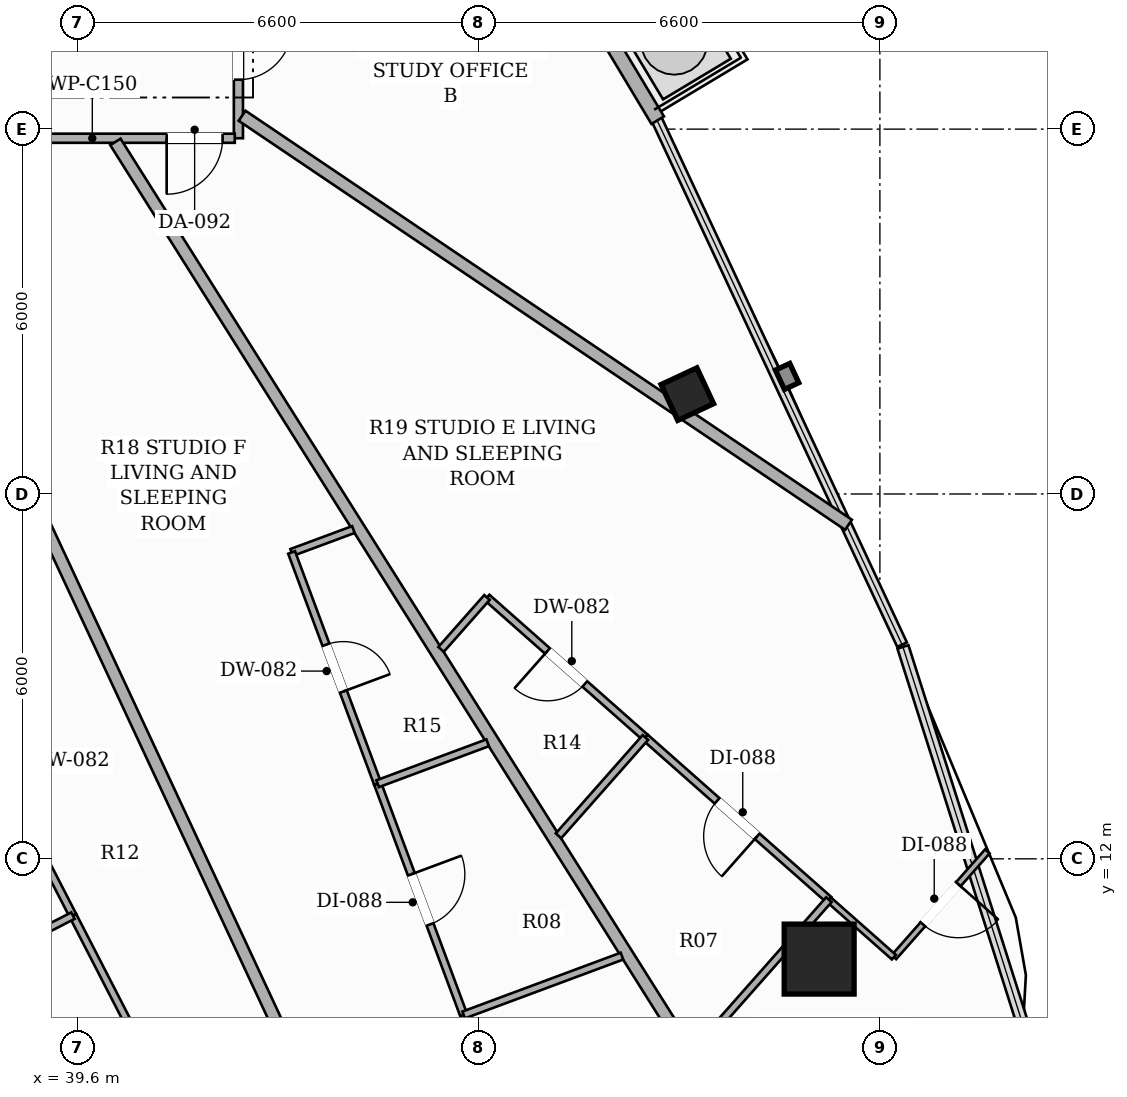
"""IFC4 building model, lengths in metres.
Left out: names, types, materials, properties, quantities, classifications, styles, units other than length and angle.
Written with IfcOpenShell. Run it as: python <this file> out.ifc"""

import sys

from ifc_helpers import new_model, si_unit, direction, frame, frame_2d, origin, origin_2d, place, context, subcontext, project, spatial, rectangle, hollow_rectangle, extrude, element, fill, save


model = new_model("IFC4")
c1 = context("Model", 3, precision=1e-05, world=origin(), true_north=direction((0.0, 1.0)))
c2 = subcontext(c1, "Body", "Model", "MODEL_VIEW")
j1 = project(units=[si_unit("LENGTHUNIT", "METRE"), si_unit("PLANEANGLEUNIT", "RADIAN")], contexts=[c1])
p1 = place(None, origin())
s1 = spatial("IfcSite", under=j1, at=p1, CompositionType="ELEMENT")
p2 = place(p1, origin())
s2 = spatial("IfcBuilding", under=s1, at=p2, CompositionType="ELEMENT")
p3 = place(p2, frame((0.0, 0.0, 256.85)))
s3 = spatial("IfcBuildingStorey", under=s2, at=p3, CompositionType="ELEMENT", Elevation=256.85)
p4 = place(p3, frame((51.801, 10.351, 0.0), z_axis=(0.0, 0.0, 1.0), x_axis=(1.0, 0.0, 0.0)))
e1 = element("IfcColumn", 1, at=p4, inside=s3, PredefinedType="COLUMN", context=c2, shape_type="SweptSolid", body=[
    extrude(hollow_rectangle(XDim=1.15, YDim=1.15, WallThickness=0.036, at=origin_2d()), origin(), (0.0, 0.0, 1.0), 3.3),
])
p5 = place(p3, frame((49.633, 19.642, 0.0), z_axis=(0.0, 0.0, 1.0), x_axis=(-0.422618261741, 0.906307787037, 0.0)))
e2 = element("IfcColumn", 2, at=p5, inside=s3, PredefinedType="COLUMN", context=c2, shape_type="SweptSolid", body=[
    extrude(hollow_rectangle(XDim=0.65, YDim=0.65, WallThickness=0.022, at=origin_2d()), origin(), (0.0, 0.0, 1.0), 3.3),
])
p6 = place(p3, frame((49.146, 24.147, 0.0), z_axis=(0.0, 0.0, 1.0), x_axis=(-0.514275407092, 0.857625096216, 0.0)))
e3 = element("IfcWall", 3, at=p6, inside=s3, PredefinedType="SOLIDWALL", context=c2, shape_type="SweptSolid", body=[
    extrude(rectangle(XDim=9.777, YDim=0.24, at=frame_2d((4.889, 0.0))), origin(), (0.0, 0.0, 1.0), 2.624),
])
p7 = place(p6, frame((7.279, 0.0, 0.0)))
e4 = element("IfcOpeningElement", 4, at=p7, cuts=e3, PredefinedType="OPENING", context=c2, shape_type="SweptSolid", body=[
    extrude(rectangle(XDim=1.8, YDim=2.2, at=frame_2d((0.9, 1.1))), frame((0.0, 0.13, 0.0), z_axis=(0.0, -1.0, 0.0), x_axis=(1.0, 0.0, 0.0)), (0.0, 0.0, 1.0), 0.26),
])
p8 = place(p3, frame((42.25, 26.59, 0.0), z_axis=(0.0, 0.0, 1.0), x_axis=(0.0, -1.0, 0.0)))
e5 = element("IfcWall", 5, at=p8, inside=s3, PredefinedType="PARTITIONING", context=c2, shape_type="SweptSolid", body=[
    extrude(rectangle(XDim=2.74, YDim=0.15, at=frame_2d((1.37, 0.0))), origin(), (0.0, 0.0, 1.0), 2.773),
])
p9 = place(p8, frame((0.897, 0.0, 0.0)))
e6 = element("IfcOpeningElement", 6, at=p9, cuts=e5, PredefinedType="OPENING", context=c2, shape_type="SweptSolid", body=[
    extrude(rectangle(XDim=0.88, YDim=2.1, at=frame_2d((0.44, 1.05))), frame((0.0, 0.085, 0.0), z_axis=(0.0, -1.0, 0.0), x_axis=(1.0, 0.0, 0.0)), (0.0, 0.0, 1.0), 0.17),
])
p10 = place(p3, frame((42.19, 23.85, 0.0), z_axis=(0.0, 0.0, 1.0), x_axis=(-1.0, 0.0, 0.0)))
e7 = element("IfcWall", 7, at=p10, inside=s3, PredefinedType="PARTITIONING", context=c2, shape_type="SweptSolid", body=[
    extrude(rectangle(XDim=8.355, YDim=0.15, at=frame_2d((4.177, 0.0))), origin(), (0.0, 0.0, 1.0), 2.565),
])
p11 = place(p10, frame((0.2, 0.0, 0.0)))
e8 = element("IfcOpeningElement", 8, at=p11, cuts=e7, PredefinedType="OPENING", context=c2, shape_type="SweptSolid", body=[
    extrude(rectangle(XDim=0.92, YDim=2.15, at=frame_2d((0.46, 1.075))), frame((0.0, 0.085, 0.0), z_axis=(0.0, -1.0, 0.0), x_axis=(1.0, 0.0, 0.0)), (0.0, 0.0, 1.0), 0.17),
])
p12 = place(p10, frame((3.566, 0.0, 0.0)))
e9 = element("IfcOpeningElement", 9, at=p12, cuts=e7, PredefinedType="OPENING", context=c2, shape_type="SweptSolid", body=[
    extrude(rectangle(XDim=0.92, YDim=2.15, at=frame_2d((0.46, 1.075))), frame((0.0, 0.085, 0.0), z_axis=(0.0, -1.0, 0.0), x_axis=(1.0, 0.0, 0.0)), (0.0, 0.0, 1.0), 0.17),
])
p13 = place(p10, frame((6.432, 0.0, 0.0)))
e10 = element("IfcOpeningElement", 10, at=p13, cuts=e7, PredefinedType="OPENING", context=c2, shape_type="SweptSolid", body=[
    extrude(rectangle(XDim=0.92, YDim=2.15, at=frame_2d((0.46, 1.075))), frame((0.0, 0.085, 0.0), z_axis=(0.0, -1.0, 0.0), x_axis=(1.0, 0.0, 0.0)), (0.0, 0.0, 1.0), 0.17),
])
p14 = place(p3, frame((52.284, 17.493, 0.0), z_axis=(0.0, 0.0, 1.0), x_axis=(-0.829053532208, 0.559169241584, 0.0)))
e11 = element("IfcWall", 11, at=p14, inside=s3, PredefinedType="PARTITIONING", context=c2, shape_type="SweptSolid", body=[
    extrude(rectangle(XDim=12.031, YDim=0.2, at=frame_2d((6.015, 0.0))), origin(), (0.0, 0.0, 1.0), 2.492),
])
p15 = place(p3, frame((50.863, 6.899, 0.0), z_axis=(0.0, 0.0, 1.0), x_axis=(-0.532843438342, 0.846213844259, 0.0)))
e12 = element("IfcWall", 12, at=p15, inside=s3, PredefinedType="PARTITIONING", context=c2, shape_type="SweptSolid", body=[
    extrude(rectangle(XDim=19.961, YDim=0.2, at=frame_2d((9.98, 0.0))), origin(), (0.0, 0.0, 1.0), 2.492),
])
p16 = place(p3, frame((44.391, 6.058, 0.0), z_axis=(0.0, 0.0, 1.0), x_axis=(-0.422434507673, 0.906393450289, 0.0)))
e13 = element("IfcWall", 13, at=p16, inside=s3, PredefinedType="PARTITIONING", context=c2, shape_type="SweptSolid", body=[
    extrude(rectangle(XDim=19.563, YDim=0.2, at=frame_2d((9.782, 0.0))), origin(), (0.0, 0.0, 1.0), 2.492),
])
p17 = place(p3, frame((48.943, 13.995, 0.0), z_axis=(0.0, 0.0, 1.0), x_axis=(-0.749231040751, 0.662308725275, 0.0)))
e14 = element("IfcWall", 14, at=p17, inside=s3, PredefinedType="PARTITIONING", context=c2, shape_type="SweptSolid", body=[
    extrude(rectangle(XDim=3.477, YDim=0.12, at=frame_2d((1.739, 0.0))), origin(), (0.0, 0.0, 1.0), 2.565),
])
p18 = place(p17, frame((1.329, 0.0, 0.0)))
e15 = element("IfcOpeningElement", 15, at=p18, cuts=e14, PredefinedType="OPENING", context=c2, shape_type="SweptSolid", body=[
    extrude(rectangle(XDim=0.82, YDim=2.1, at=frame_2d((0.41, 1.05))), frame((0.0, 0.07, 0.0), z_axis=(0.0, -1.0, 0.0), x_axis=(1.0, 0.0, 0.0)), (0.0, 0.0, 1.0), 0.14),
])
p19 = place(p3, frame((46.338, 16.298, 0.0), z_axis=(0.0, 0.0, 1.0), x_axis=(-0.662287293934, -0.749249985181, 0.0)))
e16 = element("IfcWall", 16, at=p19, inside=s3, PredefinedType="PARTITIONING", context=c2, shape_type="SweptSolid", body=[
    extrude(rectangle(XDim=1.14, YDim=0.12, at=frame_2d((0.57, 0.0))), origin(), (0.0, 0.0, 1.0), 3.06),
])
p20 = place(p3, frame((51.961, 11.328, 0.0), z_axis=(0.0, 0.0, 1.0), x_axis=(-0.749289212621, 0.662242913024, 0.0)))
e17 = element("IfcWall", 17, at=p20, inside=s3, PredefinedType="PARTITIONING", context=c2, shape_type="SweptSolid", body=[
    extrude(rectangle(XDim=4.028, YDim=0.12, at=frame_2d((2.014, 0.0))), origin(), (0.0, 0.0, 1.0), 2.492),
])
p21 = place(p20, frame((1.574, 0.0, 0.0)))
e18 = element("IfcOpeningElement", 18, at=p21, cuts=e17, PredefinedType="OPENING", context=c2, shape_type="SweptSolid", body=[
    extrude(rectangle(XDim=0.88, YDim=2.1, at=frame_2d((0.44, 1.05))), frame((0.0, 0.07, 0.0), z_axis=(0.0, -1.0, 0.0), x_axis=(1.0, 0.0, 0.0)), (0.0, 0.0, 1.0), 0.14),
])
p22 = place(p3, frame((54.567, 12.122, 0.0), z_axis=(0.0, 0.0, 1.0), x_axis=(-0.662212906575, -0.749315732095, 0.0)))
e19 = element("IfcWall", 19, at=p22, inside=s3, PredefinedType="PARTITIONING", context=c2, shape_type="SweptSolid", body=[
    extrude(rectangle(XDim=2.321, YDim=0.1, at=frame_2d((1.16, 0.0))), origin(), (0.0, 0.0, 1.0), 3.06),
])
p23 = place(p22, frame((0.72, 0.0, 0.0)))
e20 = element("IfcOpeningElement", 20, at=p23, cuts=e19, PredefinedType="OPENING", context=c2, shape_type="SweptSolid", body=[
    extrude(rectangle(XDim=0.88, YDim=2.1, at=frame_2d((0.44, 1.05))), frame((0.0, 0.06, 0.0), z_axis=(0.0, -1.0, 0.0), x_axis=(1.0, 0.0, 0.0)), (0.0, 0.0, 1.0), 0.12),
])
p24 = place(p3, frame((53.03, 10.383, 0.0), z_axis=(0.0, 0.0, 1.0), x_axis=(-0.749313288423, 0.66221567166, 0.0)))
e21 = element("IfcWall", 21, at=p24, inside=s3, PredefinedType="PARTITIONING", context=c2, shape_type="SweptSolid", body=[
    extrude(rectangle(XDim=1.427, YDim=0.1, at=frame_2d((0.713, 0.0))), origin(), (0.0, 0.0, 1.0), 2.492),
])
p25 = place(p3, frame((48.943, 13.995, 0.0), z_axis=(0.0, 0.0, 1.0), x_axis=(-0.662212567735, -0.749316031547, 0.0)))
e22 = element("IfcWall", 22, at=p25, inside=s3, PredefinedType="PARTITIONING", context=c2, shape_type="SweptSolid", body=[
    extrude(rectangle(XDim=2.158, YDim=0.12, at=frame_2d((1.079, 0.0))), origin(), (0.0, 0.0, 1.0), 2.565),
])
p26 = place(p3, frame((51.961, 11.328, 0.0), z_axis=(0.0, 0.0, 1.0), x_axis=(-0.662327669466, -0.74921429395, 0.0)))
e23 = element("IfcWall", 23, at=p26, inside=s3, PredefinedType="PARTITIONING", context=c2, shape_type="SweptSolid", body=[
    extrude(rectangle(XDim=3.338, YDim=0.12, at=frame_2d((1.669, 0.0))), origin(), (0.0, 0.0, 1.0), 2.492),
])
p27 = place(p3, frame((44.141, 17.415, 0.0), z_axis=(0.0, 0.0, 1.0), x_axis=(-0.937563848777, -0.347813210599, 0.0)))
e24 = element("IfcWall", 24, at=p27, inside=s3, PredefinedType="PARTITIONING", context=c2, shape_type="SweptSolid", body=[
    extrude(rectangle(XDim=1.084, YDim=0.12, at=frame_2d((0.542, 0.0))), origin(), (0.0, 0.0, 1.0), 2.773),
])
p28 = place(p3, frame((43.125, 17.038, 0.0), z_axis=(0.0, 0.0, 1.0), x_axis=(0.348728795746, -0.937223680355, 0.0)))
e25 = element("IfcWall", 25, at=p28, inside=s3, PredefinedType="PARTITIONING", context=c2, shape_type="SweptSolid", body=[
    extrude(rectangle(XDim=4.058, YDim=0.12, at=frame_2d((2.029, 0.0))), origin(), (0.0, 0.0, 1.0), 2.773),
])
p29 = place(p28, frame((1.619, 0.0, 0.0)))
e26 = element("IfcOpeningElement", 26, at=p29, cuts=e25, PredefinedType="OPENING", context=c2, shape_type="SweptSolid", body=[
    extrude(rectangle(XDim=0.82, YDim=2.1, at=frame_2d((0.41, 1.05))), frame((0.0, 0.07, 0.0), z_axis=(0.0, -1.0, 0.0), x_axis=(1.0, 0.0, 0.0)), (0.0, 0.0, 1.0), 0.14),
])
p30 = place(p3, frame((44.54, 13.235, 0.0), z_axis=(0.0, 0.0, 1.0), x_axis=(0.348709131935, -0.937230996769, 0.0)))
e27 = element("IfcWall", 27, at=p30, inside=s3, PredefinedType="PARTITIONING", context=c2, shape_type="SweptSolid", body=[
    extrude(rectangle(XDim=4.058, YDim=0.12, at=frame_2d((2.029, 0.0))), origin(), (0.0, 0.0, 1.0), 3.06),
])
p31 = place(p30, frame((1.589, 0.0, 0.0)))
e28 = element("IfcOpeningElement", 28, at=p31, cuts=e27, PredefinedType="OPENING", context=c2, shape_type="SweptSolid", body=[
    extrude(rectangle(XDim=0.88, YDim=2.1, at=frame_2d((0.44, 1.05))), frame((0.0, 0.07, 0.0), z_axis=(0.0, -1.0, 0.0), x_axis=(1.0, 0.0, 0.0)), (0.0, 0.0, 1.0), 0.14),
])
p32 = place(p3, frame((45.955, 9.432, 0.0), z_axis=(0.0, 0.0, 1.0), x_axis=(0.34888547359, -0.937165367647, 0.0)))
e29 = element("IfcWall", 29, at=p32, inside=s3, PredefinedType="PARTITIONING", context=c2, shape_type="SweptSolid", body=[
    extrude(rectangle(XDim=3.253, YDim=0.1, at=frame_2d((1.626, 0.0))), origin(), (0.0, 0.0, 1.0), 2.492),
])
p33 = place(p32, frame((1.187, 0.0, 0.0)))
e30 = element("IfcOpeningElement", 30, at=p33, cuts=e29, PredefinedType="OPENING", context=c2, shape_type="SweptSolid", body=[
    extrude(rectangle(XDim=0.88, YDim=2.1, at=frame_2d((0.44, 1.05))), frame((0.0, 0.06, 0.0), z_axis=(0.0, -1.0, 0.0), x_axis=(1.0, 0.0, 0.0)), (0.0, 0.0, 1.0), 0.12),
])
p34 = place(p3, frame((46.349, 13.908, 0.0), z_axis=(0.0, 0.0, 1.0), x_axis=(-0.937271835507, -0.348599349347, 0.0)))
e31 = element("IfcWall", 31, at=p34, inside=s3, PredefinedType="PARTITIONING", context=c2, shape_type="SweptSolid", body=[
    extrude(rectangle(XDim=1.93, YDim=0.12, at=frame_2d((0.965, 0.0))), origin(), (0.0, 0.0, 1.0), 2.773),
])
p35 = place(p3, frame((48.558, 10.4, 0.0), z_axis=(0.0, 0.0, 1.0), x_axis=(-0.937286649549, -0.34855951655, 0.0)))
e32 = element("IfcWall", 32, at=p35, inside=s3, PredefinedType="PARTITIONING", context=c2, shape_type="SweptSolid", body=[
    extrude(rectangle(XDim=2.777, YDim=0.12, at=frame_2d((1.389, 0.0))), origin(), (0.0, 0.0, 1.0), 2.773),
])
p36 = place(p3, frame((39.529, 11.066, 0.0), z_axis=(0.0, 0.0, 1.0), x_axis=(-0.457798211716, 0.889056127221, 0.0)))
e33 = element("IfcWall", 33, at=p36, inside=s3, PredefinedType="PARTITIONING", context=c2, shape_type="SweptSolid", body=[
    extrude(rectangle(XDim=5.574, YDim=0.12, at=frame_2d((2.787, 0.0))), origin(), (0.0, 0.0, 1.0), 2.773),
])
p37 = place(p36, frame((2.377, 0.0, 0.0)))
e34 = element("IfcOpeningElement", 34, at=p37, cuts=e33, PredefinedType="OPENING", context=c2, shape_type="SweptSolid", body=[
    extrude(rectangle(XDim=0.82, YDim=2.1, at=frame_2d((0.41, 1.05))), frame((0.0, 0.07, 0.0), z_axis=(0.0, -1.0, 0.0), x_axis=(1.0, 0.0, 0.0)), (0.0, 0.0, 1.0), 0.14),
])
p38 = place(p3, frame((42.228, 5.826, 0.0), z_axis=(0.0, 0.0, 1.0), x_axis=(-0.457901041138, 0.889003170143, 0.0)))
e35 = element("IfcWall", 35, at=p38, inside=s3, PredefinedType="PARTITIONING", context=c2, shape_type="SweptSolid", body=[
    extrude(rectangle(XDim=5.894, YDim=0.12, at=frame_2d((2.947, 0.0))), origin(), (0.0, 0.0, 1.0), 2.492),
])
p39 = place(p38, frame((2.507, 0.0, 0.0)))
e36 = element("IfcOpeningElement", 36, at=p39, cuts=e35, PredefinedType="OPENING", context=c2, shape_type="SweptSolid", body=[
    extrude(rectangle(XDim=0.88, YDim=2.1, at=frame_2d((0.44, 1.05))), frame((0.0, 0.07, 0.0), z_axis=(0.0, -1.0, 0.0), x_axis=(1.0, 0.0, 0.0)), (0.0, 0.0, 1.0), 0.14),
])
p40 = place(p3, frame((39.529, 11.066, 0.0), z_axis=(0.0, 0.0, 1.0), x_axis=(-0.889105964634, -0.457701413207, 0.0)))
e37 = element("IfcWall", 37, at=p40, inside=s3, PredefinedType="PARTITIONING", context=c2, shape_type="SweptSolid", body=[
    extrude(rectangle(XDim=2.154, YDim=0.12, at=frame_2d((1.077, 0.0))), origin(), (0.0, 0.0, 1.0), 2.773),
])
p41 = place(p9, origin())
e38 = element("IfcDoor", 38, at=p41, inside=s3, OperationType="SINGLE_SWING_LEFT", PredefinedType="DOOR", context=c2, shape_type="SweptSolid", body=[
    extrude(rectangle(XDim=0.88, YDim=2.1, at=frame_2d((0.44, 1.05))), frame((0.0, 0.025, 0.0), z_axis=(0.0, -1.0, 0.0), x_axis=(1.0, 0.0, 0.0)), (0.0, 0.0, 1.0), 0.05),
])
fill(e6, e38)
p42 = place(p11, origin())
e39 = element("IfcDoor", 39, at=p42, inside=s3, OperationType="SINGLE_SWING_RIGHT", PredefinedType="DOOR", context=c2, shape_type="SweptSolid", body=[
    extrude(rectangle(XDim=0.92, YDim=2.15, at=frame_2d((0.46, 1.075))), frame((0.0, 0.025, 0.0), z_axis=(0.0, -1.0, 0.0), x_axis=(1.0, 0.0, 0.0)), (0.0, 0.0, 1.0), 0.05),
])
fill(e8, e39)
p43 = place(p18, origin())
e40 = element("IfcDoor", 40, at=p43, inside=s3, OperationType="SINGLE_SWING_RIGHT", PredefinedType="DOOR", context=c2, shape_type="SweptSolid", body=[
    extrude(rectangle(XDim=0.82, YDim=2.1, at=frame_2d((0.41, 1.05))), frame((0.0, 0.025, 0.0), z_axis=(0.0, -1.0, 0.0), x_axis=(1.0, 0.0, 0.0)), (0.0, 0.0, 1.0), 0.05),
])
fill(e15, e40)
p44 = place(p21, origin())
e41 = element("IfcDoor", 41, at=p44, inside=s3, OperationType="SINGLE_SWING_LEFT", PredefinedType="DOOR", context=c2, shape_type="SweptSolid", body=[
    extrude(rectangle(XDim=0.88, YDim=2.1, at=frame_2d((0.44, 1.05))), frame((0.0, 0.025, 0.0), z_axis=(0.0, -1.0, 0.0), x_axis=(1.0, 0.0, 0.0)), (0.0, 0.0, 1.0), 0.05),
])
fill(e18, e41)
p45 = place(p23, origin())
e42 = element("IfcDoor", 42, at=p45, inside=s3, OperationType="SINGLE_SWING_LEFT", PredefinedType="DOOR", context=c2, shape_type="SweptSolid", body=[
    extrude(rectangle(XDim=0.88, YDim=2.1, at=frame_2d((0.44, 1.05))), frame((0.0, 0.025, 0.0), z_axis=(0.0, -1.0, 0.0), x_axis=(1.0, 0.0, 0.0)), (0.0, 0.0, 1.0), 0.05),
])
fill(e20, e42)
p46 = place(p29, origin())
e43 = element("IfcDoor", 43, at=p46, inside=s3, OperationType="SINGLE_SWING_RIGHT", PredefinedType="DOOR", context=c2, shape_type="SweptSolid", body=[
    extrude(rectangle(XDim=0.82, YDim=2.1, at=frame_2d((0.41, 1.05))), frame((0.0, 0.025, 0.0), z_axis=(0.0, -1.0, 0.0), x_axis=(1.0, 0.0, 0.0)), (0.0, 0.0, 1.0), 0.05),
])
fill(e26, e43)
p47 = place(p31, origin())
e44 = element("IfcDoor", 44, at=p47, inside=s3, OperationType="SINGLE_SWING_LEFT", PredefinedType="DOOR", context=c2, shape_type="SweptSolid", body=[
    extrude(rectangle(XDim=0.88, YDim=2.1, at=frame_2d((0.44, 1.05))), frame((0.0, 0.025, 0.0), z_axis=(0.0, -1.0, 0.0), x_axis=(1.0, 0.0, 0.0)), (0.0, 0.0, 1.0), 0.05),
])
fill(e28, e44)
save(model, sys.argv[1])
